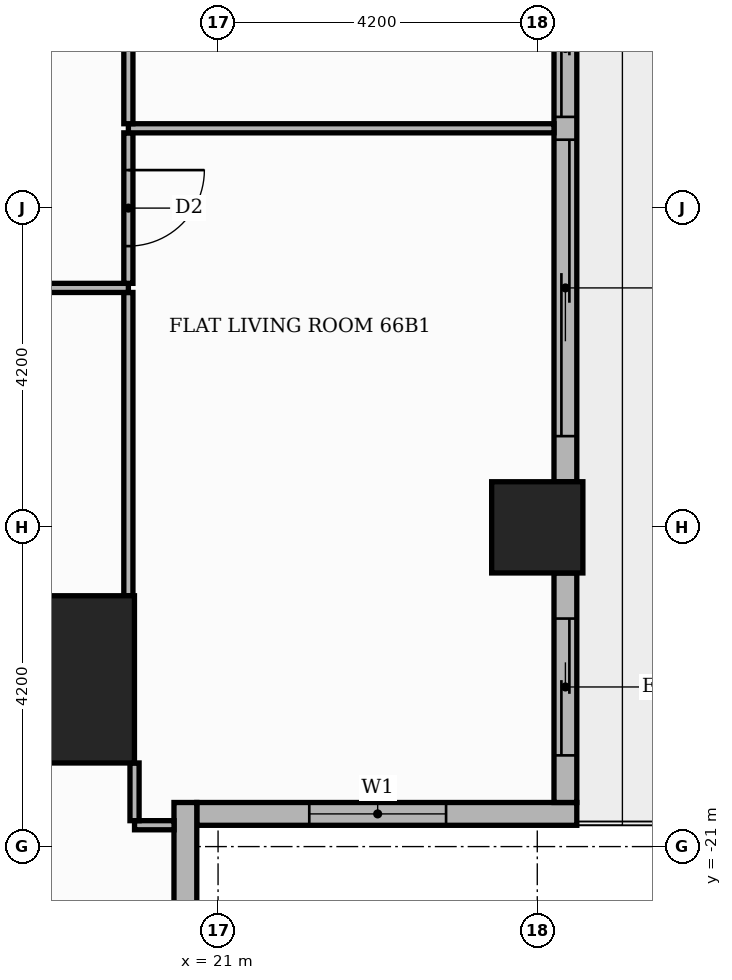
"""IFC4 building model, lengths in metres.
Left out: names, types, materials, properties, quantities, classifications, styles, units other than length and angle.
Written with IfcOpenShell. Run it as: python <this file> out.ifc"""

import sys

from ifc_helpers import new_model, si_unit, direction, frame, frame_2d, origin, origin_2d, place, context, subcontext, project, spatial, rectangle, extrude, element, fill, save


model = new_model("IFC4")
c1 = context("Model", 3, precision=1e-05, world=origin(), true_north=direction((0.0, 1.0)))
c2 = subcontext(c1, "Body", "Model", "MODEL_VIEW")
j1 = project(units=[si_unit("LENGTHUNIT", "METRE"), si_unit("PLANEANGLEUNIT", "RADIAN")], contexts=[c1])
p1 = place(None, origin())
s1 = spatial("IfcSite", under=j1, at=p1, CompositionType="ELEMENT")
p2 = place(p1, origin())
s2 = spatial("IfcBuilding", under=s1, at=p2, CompositionType="ELEMENT")
p3 = place(p2, frame((0.0, 0.0, 275.7)))
s3 = spatial("IfcBuildingStorey", under=s2, at=p3, CompositionType="ELEMENT", Elevation=275.7)
p4 = place(p3, frame((18.8, -18.8, 0.0), z_axis=(0.0, 0.0, 1.0), x_axis=(1.0, 0.0, 0.0)))
e1 = element("IfcColumn", 1, at=p4, inside=s3, PredefinedType="COLUMN", context=c2, shape_type="SweptSolid", body=[
    extrude(rectangle(XDim=2.2, YDim=2.2, at=origin_2d()), origin(), (0.0, 0.0, 1.0), 3.9),
])
p5 = place(p3, frame((25.2, -16.8, 0.0), z_axis=(0.0, 0.0, 1.0), x_axis=(1.0, 0.0, 0.0)))
e2 = element("IfcColumn", 2, at=p5, inside=s3, PredefinedType="COLUMN", context=c2, shape_type="SweptSolid", body=[
    extrude(rectangle(XDim=1.2, YDim=1.2, at=origin_2d()), origin(), (0.0, 0.0, 1.0), 3.9),
])
p6 = place(p3, frame((20.72, -20.57, 0.0), z_axis=(0.0, 0.0, 1.0), x_axis=(1.0, 0.0, 0.0)))
e3 = element("IfcWall", 3, at=p6, inside=s3, PredefinedType="STANDARD", context=c2, shape_type="SweptSolid", body=[
    extrude(rectangle(XDim=5.0, YDim=0.3, at=frame_2d((2.5, 0.0))), origin(), (0.0, 0.0, 1.0), 3.48),
])
p7 = place(p6, frame((1.48, 0.0, 0.9)))
e4 = element("IfcOpeningElement", 4, at=p7, cuts=e3, PredefinedType="OPENING", context=c2, shape_type="SweptSolid", body=[
    extrude(rectangle(XDim=1.8, YDim=2.1, at=frame_2d((0.9, 1.05))), frame((0.0, 0.16, 0.0), z_axis=(0.0, -1.0, 0.0), x_axis=(1.0, 0.0, 0.0)), (0.0, 0.0, 1.0), 0.32),
])
p8 = place(p3, frame((25.57, -20.42, 0.0), z_axis=(0.0, 0.0, 1.0), x_axis=(0.0, 1.0, 0.0)))
e5 = element("IfcWall", 5, at=p8, inside=s3, PredefinedType="STANDARD", context=c2, shape_type="SweptSolid", body=[
    extrude(rectangle(XDim=3.02, YDim=0.3, at=frame_2d((1.51, 0.0))), origin(), (0.0, 0.0, 1.0), 3.48),
])
p9 = place(p8, frame((0.62, 0.0, 0.0)))
e6 = element("IfcOpeningElement", 6, at=p9, cuts=e5, PredefinedType="OPENING", context=c2, shape_type="SweptSolid", body=[
    extrude(rectangle(XDim=1.8, YDim=2.4, at=frame_2d((0.9, 1.2))), frame((0.0, 0.16, 0.0), z_axis=(0.0, -1.0, 0.0), x_axis=(1.0, 0.0, 0.0)), (0.0, 0.0, 1.0), 0.32),
])
p10 = place(p3, frame((25.57, -16.2, 0.0), z_axis=(0.0, 0.0, 1.0), x_axis=(0.0, 1.0, 0.0)))
e7 = element("IfcWall", 7, at=p10, inside=s3, PredefinedType="STANDARD", context=c2, shape_type="SweptSolid", body=[
    extrude(rectangle(XDim=7.2, YDim=0.3, at=frame_2d((3.6, 0.0))), origin(), (0.0, 0.0, 1.0), 3.48),
])
p11 = place(p10, frame((0.6, 0.0, 0.0)))
e8 = element("IfcOpeningElement", 8, at=p11, cuts=e7, PredefinedType="OPENING", context=c2, shape_type="SweptSolid", body=[
    extrude(rectangle(XDim=3.9, YDim=2.4, at=frame_2d((1.95, 1.2))), frame((0.0, 0.16, 0.0), z_axis=(0.0, -1.0, 0.0), x_axis=(1.0, 0.0, 0.0)), (0.0, 0.0, 1.0), 0.32),
])
p12 = place(p10, frame((4.8, 0.0, 0.0)))
e9 = element("IfcOpeningElement", 9, at=p12, cuts=e7, PredefinedType="OPENING", context=c2, shape_type="SweptSolid", body=[
    extrude(rectangle(XDim=1.8, YDim=2.4, at=frame_2d((0.9, 1.2))), frame((0.0, 0.16, 0.0), z_axis=(0.0, -1.0, 0.0), x_axis=(1.0, 0.0, 0.0)), (0.0, 0.0, 1.0), 0.32),
])
p13 = place(p3, frame((20.57, -25.42, 0.0), z_axis=(0.0, 0.0, 1.0), x_axis=(0.0, 1.0, 0.0)))
e10 = element("IfcWall", 10, at=p13, inside=s3, PredefinedType="STANDARD", context=c2, shape_type="SweptSolid", body=[
    extrude(rectangle(XDim=5.0, YDim=0.3, at=frame_2d((2.5, 0.0))), origin(), (0.0, 0.0, 1.0), 3.48),
])
p14 = place(p13, frame((1.42, 0.0, 0.9)))
e11 = element("IfcOpeningElement", 11, at=p14, cuts=e10, PredefinedType="OPENING", context=c2, shape_type="SweptSolid", body=[
    extrude(rectangle(XDim=1.8, YDim=2.1, at=frame_2d((0.9, 1.05))), frame((0.0, 0.16, 0.0), z_axis=(0.0, -1.0, 0.0), x_axis=(1.0, 0.0, 0.0)), (0.0, 0.0, 1.0), 0.32),
])
p15 = place(p3, frame((19.901, -20.719, 0.0), z_axis=(0.0, 0.0, 1.0), x_axis=(1.0, 0.0, 0.0)))
e12 = element("IfcWall", 12, at=p15, inside=s3, PredefinedType="PARTITIONING", context=c2, shape_type="SweptSolid", body=[
    extrude(rectangle(XDim=0.52, YDim=0.12, at=frame_2d((0.26, 0.0))), origin(), (0.0, 0.0, 1.0), 3.48),
])
p16 = place(p3, frame((19.901, -20.659, 0.0), z_axis=(0.0, 0.0, 1.0), x_axis=(0.0, 1.0, 0.0)))
e13 = element("IfcWall", 13, at=p16, inside=s3, PredefinedType="PARTITIONING", context=c2, shape_type="SweptSolid", body=[
    extrude(rectangle(XDim=0.759, YDim=0.12, at=frame_2d((0.379, 0.0))), origin(), (0.0, 0.0, 1.0), 3.48),
])
p17 = place(p3, frame((19.82, -17.7, 0.0), z_axis=(0.0, 0.0, 1.0), x_axis=(0.0, 1.0, 0.0)))
e14 = element("IfcWall", 14, at=p17, inside=s3, PredefinedType="PARTITIONING", context=c2, shape_type="SweptSolid", body=[
    extrude(rectangle(XDim=3.99, YDim=0.12, at=frame_2d((1.995, 0.0))), origin(), (0.0, 0.0, 1.0), 3.48),
])
p18 = place(p3, frame((13.65, -13.65, 0.0), z_axis=(0.0, 0.0, 1.0), x_axis=(1.0, 0.0, 0.0)))
e15 = element("IfcWall", 15, at=p18, inside=s3, PredefinedType="PARTITIONING", context=c2, shape_type="SweptSolid", body=[
    extrude(rectangle(XDim=6.17, YDim=0.12, at=frame_2d((3.085, 0.0))), origin(), (0.0, 0.0, 1.0), 3.48),
])
p19 = place(p18, frame((2.585, 0.0, 0.0)))
e16 = element("IfcOpeningElement", 16, at=p19, cuts=e15, PredefinedType="OPENING", context=c2, shape_type="SweptSolid", body=[
    extrude(rectangle(XDim=1.0, YDim=2.1, at=frame_2d((0.5, 1.05))), frame((0.0, 0.07, 0.0), z_axis=(0.0, -1.0, 0.0), x_axis=(1.0, 0.0, 0.0)), (0.0, 0.0, 1.0), 0.14),
])
p20 = place(p3, frame((19.82, -13.59, 0.0), z_axis=(0.0, 0.0, 1.0), x_axis=(0.0, 1.0, 0.0)))
e17 = element("IfcWall", 17, at=p20, inside=s3, PredefinedType="PARTITIONING", context=c2, shape_type="SweptSolid", body=[
    extrude(rectangle(XDim=1.98, YDim=0.12, at=frame_2d((0.99, 0.0))), origin(), (0.0, 0.0, 1.0), 3.48),
])
p21 = place(p20, frame((0.49, 0.0, 0.0)))
e18 = element("IfcOpeningElement", 18, at=p21, cuts=e17, PredefinedType="OPENING", context=c2, shape_type="SweptSolid", body=[
    extrude(rectangle(XDim=1.0, YDim=2.1, at=frame_2d((0.5, 1.05))), frame((0.0, 0.07, 0.0), z_axis=(0.0, -1.0, 0.0), x_axis=(1.0, 0.0, 0.0)), (0.0, 0.0, 1.0), 0.14),
])
p22 = place(p3, frame((19.82, -11.55, 0.0), z_axis=(0.0, 0.0, 1.0), x_axis=(1.0, 0.0, 0.0)))
e19 = element("IfcWall", 19, at=p22, inside=s3, PredefinedType="PARTITIONING", context=c2, shape_type="SweptSolid", body=[
    extrude(rectangle(XDim=5.6, YDim=0.12, at=frame_2d((2.8, 0.0))), origin(), (0.0, 0.0, 1.0), 3.48),
])
p23 = place(p3, frame((19.82, -11.49, 0.0), z_axis=(0.0, 0.0, 1.0), x_axis=(0.0, 1.0, 0.0)))
e20 = element("IfcWall", 20, at=p23, inside=s3, PredefinedType="PARTITIONING", context=c2, shape_type="SweptSolid", body=[
    extrude(rectangle(XDim=6.18, YDim=0.12, at=frame_2d((3.09, 0.0))), origin(), (0.0, 0.0, 1.0), 3.48),
])
p24 = place(p23, frame((2.64, 0.0, 0.0)))
e21 = element("IfcOpeningElement", 21, at=p24, cuts=e20, PredefinedType="OPENING", context=c2, shape_type="SweptSolid", body=[
    extrude(rectangle(XDim=0.9, YDim=2.1, at=frame_2d((0.45, 1.05))), frame((0.0, 0.07, 0.0), z_axis=(0.0, -1.0, 0.0), x_axis=(1.0, 0.0, 0.0)), (0.0, 0.0, 1.0), 0.14),
])
p25 = place(p7, origin())
e22 = element("IfcWindow", 22, at=p25, inside=s3, PartitioningType="SINGLE_PANEL", PredefinedType="WINDOW", context=c2, shape_type="SweptSolid", body=[
    extrude(rectangle(XDim=1.8, YDim=2.1, at=frame_2d((0.9, 1.05))), frame((0.0, 0.03, 0.0), z_axis=(0.0, -1.0, 0.0), x_axis=(1.0, 0.0, 0.0)), (0.0, 0.0, 1.0), 0.06),
])
fill(e4, e22)
p26 = place(p9, origin())
e23 = element("IfcDoor", 23, at=p26, inside=s3, OperationType="SLIDING_TO_RIGHT", PredefinedType="DOOR", context=c2, shape_type="SweptSolid", body=[
    extrude(rectangle(XDim=1.8, YDim=2.4, at=frame_2d((0.9, 1.2))), frame((0.0, 0.025, 0.0), z_axis=(0.0, -1.0, 0.0), x_axis=(1.0, 0.0, 0.0)), (0.0, 0.0, 1.0), 0.05),
])
fill(e6, e23)
p27 = place(p11, origin())
e24 = element("IfcDoor", 24, at=p27, inside=s3, OperationType="SLIDING_TO_LEFT", PredefinedType="DOOR", context=c2, shape_type="SweptSolid", body=[
    extrude(rectangle(XDim=3.9, YDim=2.4, at=frame_2d((1.95, 1.2))), frame((0.0, 0.025, 0.0), z_axis=(0.0, -1.0, 0.0), x_axis=(1.0, 0.0, 0.0)), (0.0, 0.0, 1.0), 0.05),
])
fill(e8, e24)
p28 = place(p12, origin())
e25 = element("IfcDoor", 25, at=p28, inside=s3, OperationType="SLIDING_TO_RIGHT", PredefinedType="DOOR", context=c2, shape_type="SweptSolid", body=[
    extrude(rectangle(XDim=1.8, YDim=2.4, at=frame_2d((0.9, 1.2))), frame((0.0, 0.025, 0.0), z_axis=(0.0, -1.0, 0.0), x_axis=(1.0, 0.0, 0.0)), (0.0, 0.0, 1.0), 0.05),
])
fill(e9, e25)
p29 = place(p21, frame((1.0, 0.0, 0.0), z_axis=(0.0, 0.0, 1.0), x_axis=(-1.0, 0.0, 0.0)))
e26 = element("IfcDoor", 26, at=p29, inside=s3, OperationType="SINGLE_SWING_RIGHT", PredefinedType="DOOR", context=c2, shape_type="SweptSolid", body=[
    extrude(rectangle(XDim=1.0, YDim=2.1, at=frame_2d((0.5, 1.05))), frame((0.0, 0.025, 0.0), z_axis=(0.0, -1.0, 0.0), x_axis=(1.0, 0.0, 0.0)), (0.0, 0.0, 1.0), 0.05),
])
fill(e18, e26)
save(model, sys.argv[1])
